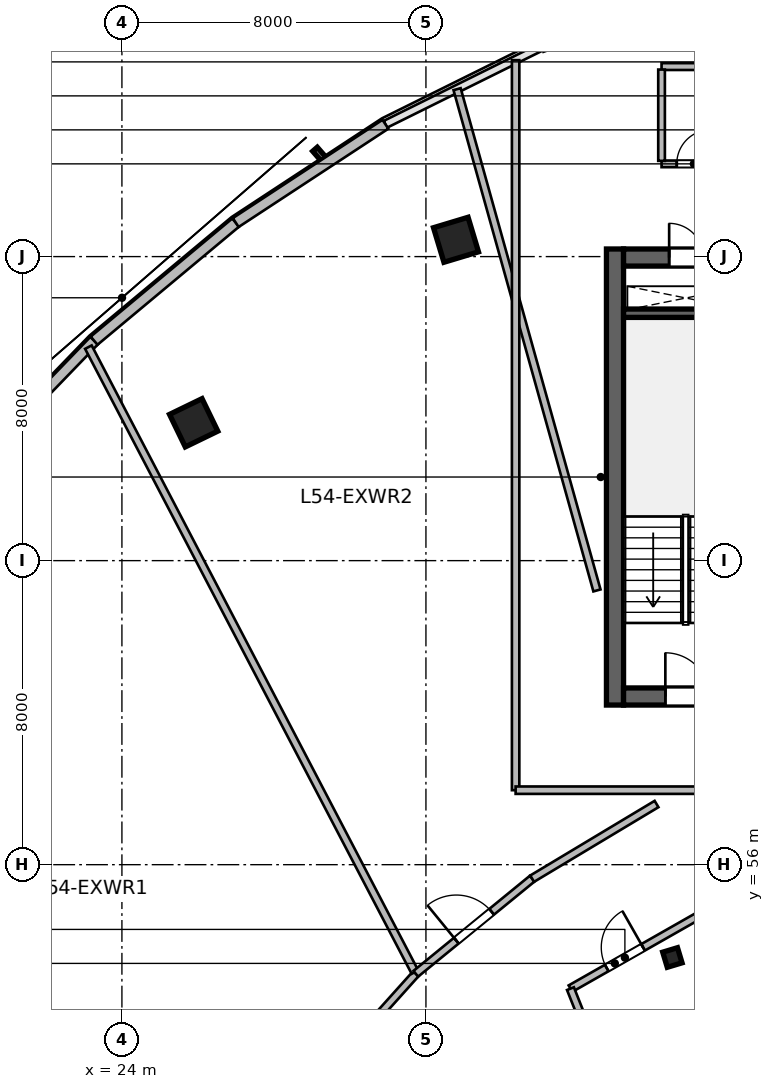
"""IFC4 building model, lengths in metres.
Left out: names, types, materials, properties, quantities, classifications, styles, units other than length and angle.
Written with IfcOpenShell. Run it as: python <this file> out.ifc"""

import sys

from ifc_helpers import new_model, si_unit, direction, frame, frame_2d, origin, origin_2d, place, context, subcontext, project, spatial, rectangle, i_section, extrude, source, transform, mapped, element, fill, save


model = new_model("IFC4")
c1 = context("Model", 3, precision=1e-05, world=origin(), true_north=direction((0.0, 1.0)))
c2 = subcontext(c1, "Body", "Model", "MODEL_VIEW")
j1 = project(units=[si_unit("LENGTHUNIT", "METRE"), si_unit("PLANEANGLEUNIT", "RADIAN")], contexts=[c1])
p1 = place(None, origin())
s1 = spatial("IfcSite", under=j1, at=p1, CompositionType="ELEMENT")
p2 = place(p1, origin())
s2 = spatial("IfcBuilding", under=s1, at=p2, CompositionType="ELEMENT")
p3 = place(p2, frame((0.0, 0.0, 223.5)))
s3 = spatial("IfcBuildingStorey", under=s2, at=p3, CompositionType="ELEMENT", Elevation=223.5)
m1 = source(origin(), c2, "Body", "SweptSolid", [
    extrude(rectangle(XDim=12.0, YDim=0.45, at=frame_2d((6.0, 0.0))), origin(), (0.0, 0.0, 1.0), 3.9),
])
p4 = place(p3, frame((36.975, 60.2, 0.0), z_axis=(0.0, 0.0, 1.0), x_axis=(0.0, 1.0, 0.0)))
e1 = element("IfcWall", 1, at=p4, inside=s3, PredefinedType="SHEAR", context=c2, shape_type="MappedRepresentation", body=[
    mapped(m1, transform((0.0, 0.0, 0.0), scale=1.0)),
])
m2 = source(origin(), c2, "Body", "SweptSolid", [
    extrude(rectangle(XDim=21.6, YDim=0.45, at=frame_2d((10.8, 0.0))), origin(), (0.0, 0.0, 1.0), 3.9),
])
p5 = place(p3, frame((37.2, 60.425, 0.0), z_axis=(0.0, 0.0, 1.0), x_axis=(1.0, 0.0, 0.0)))
e2 = element("IfcWall", 2, at=p5, inside=s3, PredefinedType="SHEAR", context=c2, shape_type="MappedRepresentation", body=[
    mapped(m2, transform((0.0, 0.0, 0.0), scale=1.0)),
])
p6 = place(p5, frame((1.1, 0.0, 0.0)))
e3 = element("IfcOpeningElement", 3, at=p6, cuts=e2, PredefinedType="OPENING", context=c2, shape_type="SweptSolid", body=[
    extrude(rectangle(XDim=1.15, YDim=2.15, at=frame_2d((0.575, 1.075))), frame((0.0, 0.235, 0.0), z_axis=(0.0, -1.0, 0.0), x_axis=(1.0, 0.0, 0.0)), (0.0, 0.0, 1.0), 0.47),
])
p7 = place(p5, frame((19.5, 0.0, 0.0)))
e4 = element("IfcOpeningElement", 4, at=p7, cuts=e2, PredefinedType="OPENING", context=c2, shape_type="SweptSolid", body=[
    extrude(rectangle(XDim=0.9, YDim=2.1, at=frame_2d((0.45, 1.05))), frame((0.0, 0.235, 0.0), z_axis=(0.0, -1.0, 0.0), x_axis=(1.0, 0.0, 0.0)), (0.0, 0.0, 1.0), 0.47),
])
p8 = place(p5, frame((12.02, 0.0, 0.0)))
e5 = element("IfcOpeningElement", 5, at=p8, cuts=e2, PredefinedType="OPENING", context=c2, shape_type="SweptSolid", body=[
    extrude(rectangle(XDim=1.6, YDim=2.15, at=frame_2d((0.8, 1.075))), frame((0.0, 0.235, 0.0), z_axis=(0.0, -1.0, 0.0), x_axis=(1.0, 0.0, 0.0)), (0.0, 0.0, 1.0), 0.47),
])
p9 = place(p3, frame((37.2, 71.975, 0.0), z_axis=(0.0, 0.0, 1.0), x_axis=(1.0, 0.0, 0.0)))
e6 = element("IfcWall", 6, at=p9, inside=s3, PredefinedType="SHEAR", context=c2, shape_type="MappedRepresentation", body=[
    mapped(m2, transform((0.0, 0.0, 0.0), scale=1.0)),
])
p10 = place(p9, frame((1.2, 0.0, 0.0)))
e7 = element("IfcOpeningElement", 7, at=p10, cuts=e6, PredefinedType="OPENING", context=c2, shape_type="SweptSolid", body=[
    extrude(rectangle(XDim=0.9, YDim=2.1, at=frame_2d((0.45, 1.05))), frame((0.0, 0.235, 0.0), z_axis=(0.0, -1.0, 0.0), x_axis=(1.0, 0.0, 0.0)), (0.0, 0.0, 1.0), 0.47),
])
p11 = place(p9, frame((14.7, 0.0, 0.0)))
e8 = element("IfcOpeningElement", 8, at=p11, cuts=e6, PredefinedType="OPENING", context=c2, shape_type="SweptSolid", body=[
    extrude(rectangle(XDim=1.2, YDim=2.15, at=frame_2d((0.6, 1.075))), frame((0.0, 0.235, 0.0), z_axis=(0.0, -1.0, 0.0), x_axis=(1.0, 0.0, 0.0)), (0.0, 0.0, 1.0), 0.47),
])
p12 = place(p9, frame((4.15, 0.0, 0.0)))
e9 = element("IfcOpeningElement", 9, at=p12, cuts=e6, PredefinedType="OPENING", context=c2, shape_type="SweptSolid", body=[
    extrude(rectangle(XDim=1.3, YDim=2.15, at=frame_2d((0.65, 1.075))), frame((0.0, 0.235, 0.0), z_axis=(0.0, -1.0, 0.0), x_axis=(1.0, 0.0, 0.0)), (0.0, 0.0, 1.0), 0.47),
])
p13 = place(p9, frame((7.1, 0.0, 0.0)))
e10 = element("IfcOpeningElement", 10, at=p13, cuts=e6, PredefinedType="OPENING", context=c2, shape_type="SweptSolid", body=[
    extrude(rectangle(XDim=0.9, YDim=2.1, at=frame_2d((0.45, 1.05))), frame((0.0, 0.235, 0.0), z_axis=(0.0, -1.0, 0.0), x_axis=(1.0, 0.0, 0.0)), (0.0, 0.0, 1.0), 0.47),
])
m3 = source(origin(), c2, "Body", "SweptSolid", [
    extrude(rectangle(XDim=3.27, YDim=0.22, at=frame_2d((1.635, 0.0))), origin(), (0.0, 0.0, 1.0), 3.9),
])
p14 = place(p3, frame((37.2, 70.51, 0.0), z_axis=(0.0, 0.0, 1.0), x_axis=(1.0, 0.0, 0.0)))
e11 = element("IfcWall", 11, at=p14, inside=s3, PredefinedType="SHEAR", context=c2, shape_type="MappedRepresentation", body=[
    mapped(m3, transform((0.0, 0.0, 0.0), scale=1.0)),
])
m4 = source(origin(), c2, "Body", "SweptSolid", [
    extrude(rectangle(XDim=0.95, YDim=0.95, at=origin_2d()), origin(), (0.0, 0.0, 1.0), 3.9),
])
p15 = place(p3, frame((25.888, 67.627, 0.0), z_axis=(0.0, 0.0, 1.0), x_axis=(-0.436173672171, 0.899862504889, 0.0)))
e12 = element("IfcColumn", 12, at=p15, inside=s3, PredefinedType="COLUMN", context=c2, shape_type="MappedRepresentation", body=[
    mapped(m4, transform((0.0, 0.0, 0.0), scale=1.0)),
])
m5 = source(origin(), c2, "Body", "SweptSolid", [
    extrude(i_section(OverallWidth=0.406, OverallDepth=0.416, WebThickness=0.03, FlangeThickness=0.048, at=origin_2d()), origin(), (0.0, 0.0, 1.0), 3.9),
])
p16 = place(p3, frame((38.485, 53.558, 0.0), z_axis=(0.0, 0.0, 1.0), x_axis=(-0.288697611798, 0.957420330337, 0.0)))
e13 = element("IfcColumn", 13, at=p16, inside=s3, PredefinedType="COLUMN", context=c2, shape_type="MappedRepresentation", body=[
    mapped(m5, transform((0.0, 0.0, 0.0), scale=1.0)),
])
p17 = place(p3, frame((32.791, 72.442, 0.0), z_axis=(0.0, 0.0, 1.0), x_axis=(-0.288697611798, 0.957420330337, 0.0)))
e14 = element("IfcColumn", 14, at=p17, inside=s3, PredefinedType="COLUMN", context=c2, shape_type="MappedRepresentation", body=[
    mapped(m4, transform((0.0, 0.0, 0.0), scale=1.0)),
])
m6 = source(origin(), c2, "Body", "SweptSolid", [
    extrude(rectangle(XDim=5.001, YDim=0.28, at=frame_2d((2.5, 0.0))), origin(), (0.0, 0.0, 1.0), 3.64),
])
p18 = place(p3, frame((19.795, 66.19, 0.0), z_axis=(0.0, 0.0, 1.0), x_axis=(0.694572731818, 0.719422490762, 0.0)))
e15 = element("IfcWall", 15, at=p18, inside=s3, PredefinedType="SOLIDWALL", context=c2, shape_type="MappedRepresentation", body=[
    mapped(m6, transform((0.0, 0.0, 0.0), scale=1.0)),
])
m7 = source(origin(), c2, "Body", "SweptSolid", [
    extrude(rectangle(XDim=4.852, YDim=0.28, at=frame_2d((2.426, 0.0))), origin(), (0.0, 0.0, 1.0), 3.64),
])
p19 = place(p3, frame((23.268, 69.788, 0.0), z_axis=(0.0, 0.0, 1.0), x_axis=(0.767936605821, 0.640525853843, 0.0)))
e16 = element("IfcWall", 16, at=p19, inside=s3, PredefinedType="SOLIDWALL", context=c2, shape_type="MappedRepresentation", body=[
    mapped(m7, transform((0.0, 0.0, 0.0), scale=1.0)),
])
m8 = source(origin(), c2, "Body", "SweptSolid", [
    extrude(rectangle(XDim=4.713, YDim=0.28, at=frame_2d((2.356, 0.0))), origin(), (0.0, 0.0, 1.0), 3.64),
])
p20 = place(p3, frame((26.994, 72.896, 0.0), z_axis=(0.0, 0.0, 1.0), x_axis=(0.835974386457, 0.548768462275, 0.0)))
e17 = element("IfcWall", 17, at=p20, inside=s3, PredefinedType="SOLIDWALL", context=c2, shape_type="MappedRepresentation", body=[
    mapped(m8, transform((0.0, 0.0, 0.0), scale=1.0)),
])
m9 = source(origin(), c2, "Body", "SweptSolid", [
    extrude(rectangle(XDim=4.0, YDim=0.175, at=frame_2d((2.0, 0.0))), origin(), (0.0, 0.0, 1.0), 3.64),
])
p21 = place(p3, frame((38.2, 74.44, 0.0), z_axis=(0.0, 0.0, 1.0), x_axis=(1.0, 0.0, 0.0)))
e18 = element("IfcWall", 18, at=p21, inside=s3, PredefinedType="PARTITIONING", context=c2, shape_type="MappedRepresentation", body=[
    mapped(m9, transform((0.0, 0.0, 0.0), scale=1.0)),
])
p22 = place(p21, frame((0.4, 0.0, 0.0)))
e19 = element("IfcOpeningElement", 19, at=p22, cuts=e18, PredefinedType="OPENING", context=c2, shape_type="SweptSolid", body=[
    extrude(rectangle(XDim=0.9, YDim=2.08, at=frame_2d((0.45, 1.04))), frame((0.0, 0.098, 0.0), z_axis=(0.0, -1.0, 0.0), x_axis=(1.0, 0.0, 0.0)), (0.0, 0.0, 1.0), 0.195),
])
m10 = source(origin(), c2, "Body", "SweptSolid", [
    extrude(rectangle(XDim=4.0, YDim=0.18, at=frame_2d((2.0, 0.0))), origin(), (0.0, 0.0, 1.0), 3.64),
])
p23 = place(p3, frame((38.2, 77.0, 0.0), z_axis=(0.0, 0.0, 1.0), x_axis=(1.0, 0.0, 0.0)))
e20 = element("IfcWall", 20, at=p23, inside=s3, PredefinedType="PLUMBINGWALL", context=c2, shape_type="MappedRepresentation", body=[
    mapped(m10, transform((0.0, 0.0, 0.0), scale=1.0)),
])
m11 = source(origin(), c2, "Body", "SweptSolid", [
    extrude(rectangle(XDim=2.403, YDim=0.175, at=frame_2d((1.201, 0.0))), origin(), (0.0, 0.0, 1.0), 3.64),
])
p24 = place(p3, frame((38.2, 74.519, 0.0), z_axis=(0.0, 0.0, 1.0), x_axis=(0.0, 1.0, 0.0)))
e21 = element("IfcWall", 21, at=p24, inside=s3, PredefinedType="PARTITIONING", context=c2, shape_type="MappedRepresentation", body=[
    mapped(m11, transform((0.0, 0.0, 0.0), scale=1.0)),
])
m12 = source(origin(), c2, "Body", "SweptSolid", [
    extrude(rectangle(XDim=4.796, YDim=0.195, at=frame_2d((2.398, 0.0))), origin(), (0.0, 0.0, 1.0), 3.64),
])
p25 = place(p3, frame((35.803, 52.738, 0.0), z_axis=(0.0, 0.0, 1.0), x_axis=(0.869231352707, 0.494405557686, 0.0)))
e22 = element("IfcWall", 22, at=p25, inside=s3, PredefinedType="PARTITIONING", context=c2, shape_type="MappedRepresentation", body=[
    mapped(m12, transform((0.0, 0.0, 0.0), scale=1.0)),
])
p26 = place(p25, frame((1.098, 0.0, 0.0)))
e23 = element("IfcOpeningElement", 23, at=p26, cuts=e22, PredefinedType="OPENING", context=c2, shape_type="SweptSolid", body=[
    extrude(rectangle(XDim=1.1, YDim=2.15, at=frame_2d((0.55, 1.075))), frame((0.0, 0.107, 0.0), z_axis=(0.0, -1.0, 0.0), x_axis=(1.0, 0.0, 0.0)), (0.0, 0.0, 1.0), 0.215),
])
m13 = source(origin(), c2, "Body", "SweptSolid", [
    extrude(rectangle(XDim=4.32, YDim=0.195, at=frame_2d((2.16, 0.0))), origin(), (0.0, 0.0, 1.0), 3.64),
])
p27 = place(p3, frame((37.396, 48.723, 0.0), z_axis=(0.0, 0.0, 1.0), x_axis=(-0.368846295269, 0.929490403644, 0.0)))
e24 = element("IfcWall", 24, at=p27, inside=s3, PredefinedType="PARTITIONING", context=c2, shape_type="MappedRepresentation", body=[
    mapped(m13, transform((0.0, 0.0, 0.0), scale=1.0)),
])
m14 = source(origin(), c2, "Body", "SweptSolid", [
    extrude(rectangle(XDim=5.407, YDim=0.195, at=frame_2d((2.704, 0.0))), origin(), (0.0, 0.0, 1.0), 3.64),
])
p28 = place(p3, frame((28.122, 49.105, 0.0), z_axis=(0.0, 0.0, 1.0), x_axis=(0.667851383423, 0.744294652447, 0.0)))
e25 = element("IfcWall", 25, at=p28, inside=s3, PredefinedType="PARTITIONING", context=c2, shape_type="MappedRepresentation", body=[
    mapped(m14, transform((0.0, 0.0, 0.0), scale=1.0)),
])
m15 = source(origin(), c2, "Body", "SweptSolid", [
    extrude(rectangle(XDim=16.854, YDim=0.195, at=frame_2d((8.427, 0.0))), origin(), (0.0, 0.0, 1.0), 3.64),
])
p29 = place(p3, frame((25.024, 44.369, 0.0), z_axis=(0.0, 0.0, 1.0), x_axis=(-0.716517105841, 0.697569521294, 0.0)))
e26 = element("IfcWall", 26, at=p29, inside=s3, PredefinedType="PARTITIONING", context=c2, shape_type="MappedRepresentation", body=[
    mapped(m15, transform((0.0, 0.0, 0.0), scale=1.0)),
])
m16 = source(origin(), c2, "Body", "SweptSolid", [
    extrude(rectangle(XDim=18.554, YDim=0.195, at=frame_2d((9.277, 0.0))), origin(), (0.0, 0.0, 1.0), 3.64),
])
p30 = place(p3, frame((31.71, 53.174, 0.0), z_axis=(0.0, 0.0, 1.0), x_axis=(-0.463116799203, 0.886297258427, 0.0)))
e27 = element("IfcWall", 27, at=p30, inside=s3, PredefinedType="PARTITIONING", context=c2, shape_type="MappedRepresentation", body=[
    mapped(m16, transform((0.0, 0.0, 0.0), scale=1.0)),
])
m17 = source(origin(), c2, "Body", "SweptSolid", [
    extrude(rectangle(XDim=3.954, YDim=0.195, at=frame_2d((1.977, 0.0))), origin(), (0.0, 0.0, 1.0), 3.64),
])
p31 = place(p3, frame((31.733, 53.13, 0.0), z_axis=(0.0, 0.0, 1.0), x_axis=(0.774345047596, 0.632763579281, 0.0)))
e28 = element("IfcWall", 28, at=p31, inside=s3, PredefinedType="PARTITIONING", context=c2, shape_type="MappedRepresentation", body=[
    mapped(m17, transform((0.0, 0.0, 0.0), scale=1.0)),
])
p32 = place(p31, frame((1.377, 0.0, 0.0)))
e29 = element("IfcOpeningElement", 29, at=p32, cuts=e28, PredefinedType="OPENING", context=c2, shape_type="SweptSolid", body=[
    extrude(rectangle(XDim=1.2, YDim=2.15, at=frame_2d((0.6, 1.075))), frame((0.0, 0.107, 0.0), z_axis=(0.0, -1.0, 0.0), x_axis=(1.0, 0.0, 0.0)), (0.0, 0.0, 1.0), 0.215),
])
m18 = source(origin(), c2, "Body", "SweptSolid", [
    extrude(rectangle(XDim=3.817, YDim=0.195, at=frame_2d((1.909, 0.0))), origin(), (0.0, 0.0, 1.0), 3.64),
])
p33 = place(p3, frame((34.795, 55.632, 0.0), z_axis=(0.0, 0.0, 1.0), x_axis=(0.857453418218, 0.514561595522, 0.0)))
e30 = element("IfcWall", 30, at=p33, inside=s3, PredefinedType="PARTITIONING", context=c2, shape_type="MappedRepresentation", body=[
    mapped(m18, transform((0.0, 0.0, 0.0), scale=1.0)),
])
m19 = source(origin(), c2, "Body", "SweptSolid", [
    extrude(rectangle(XDim=13.694, YDim=0.195, at=frame_2d((6.847, 0.0))), origin(), (0.0, 0.0, 1.0), 3.64),
])
p34 = place(p3, frame((36.5, 63.216, 0.0), z_axis=(0.0, 0.0, 1.0), x_axis=(-0.268753576604, 0.963208967495, 0.0)))
e31 = element("IfcWall", 31, at=p34, inside=s3, PredefinedType="PARTITIONING", context=c2, shape_type="MappedRepresentation", body=[
    mapped(m19, transform((0.0, 0.0, 0.0), scale=1.0)),
])
m20 = source(origin(), c2, "Body", "SweptSolid", [
    extrude(rectangle(XDim=19.209, YDim=0.195, at=frame_2d((9.604, 0.0))), origin(), (0.0, 0.0, 1.0), 3.64),
])
p35 = place(p3, frame((34.36, 57.96, 0.0), z_axis=(0.0, 0.0, 1.0), x_axis=(0.0, 1.0, 0.0)))
e32 = element("IfcWall", 32, at=p35, inside=s3, PredefinedType="PARTITIONING", context=c2, shape_type="MappedRepresentation", body=[
    mapped(m20, transform((0.0, 0.0, 0.0), scale=1.0)),
])
m21 = source(origin(), c2, "Body", "SweptSolid", [
    extrude(rectangle(XDim=12.39, YDim=0.195, at=frame_2d((6.195, 0.0))), origin(), (0.0, 0.0, 1.0), 3.64),
])
p36 = place(p3, frame((34.36, 57.96, 0.0), z_axis=(0.0, 0.0, 1.0), x_axis=(1.0, 0.0, 0.0)))
e33 = element("IfcWall", 33, at=p36, inside=s3, PredefinedType="PARTITIONING", context=c2, shape_type="MappedRepresentation", body=[
    mapped(m21, transform((0.0, 0.0, 0.0), scale=1.0)),
])
m22 = source(origin(), c2, "Body", "SweptSolid", [
    extrude(rectangle(XDim=1.15, YDim=2.15, at=frame_2d((0.575, 1.075))), frame((0.0, 0.025, 0.0), z_axis=(0.0, -1.0, 0.0), x_axis=(1.0, 0.0, 0.0)), (0.0, 0.0, 1.0), 0.05),
])
p37 = place(p6, origin())
e34 = element("IfcDoor", 34, at=p37, inside=s3, OperationType="SINGLE_SWING_LEFT", PredefinedType="DOOR", context=c2, shape_type="MappedRepresentation", body=[
    mapped(m22, transform((0.0, 0.0, 0.0), scale=1.0)),
])
fill(e3, e34)
m23 = source(origin(), c2, "Body", "SweptSolid", [
    extrude(rectangle(XDim=0.9, YDim=2.1, at=frame_2d((0.45, 1.05))), frame((0.0, 0.025, 0.0), z_axis=(0.0, -1.0, 0.0), x_axis=(1.0, 0.0, 0.0)), (0.0, 0.0, 1.0), 0.05),
])
p38 = place(p10, origin())
e35 = element("IfcDoor", 35, at=p38, inside=s3, OperationType="SINGLE_SWING_LEFT", PredefinedType="DOOR", context=c2, shape_type="MappedRepresentation", body=[
    mapped(m23, transform((0.0, 0.0, 0.0), scale=1.0)),
])
fill(e7, e35)
m24 = source(origin(), c2, "Body", "SweptSolid", [
    extrude(rectangle(XDim=0.9, YDim=2.08, at=frame_2d((0.45, 1.04))), frame((0.0, 0.025, 0.0), z_axis=(0.0, -1.0, 0.0), x_axis=(1.0, 0.0, 0.0)), (0.0, 0.0, 1.0), 0.05),
])
p39 = place(p22, origin())
e36 = element("IfcDoor", 36, at=p39, inside=s3, OperationType="SINGLE_SWING_RIGHT", PredefinedType="DOOR", context=c2, shape_type="MappedRepresentation", body=[
    mapped(m24, transform((0.0, 0.0, 0.0), scale=1.0)),
])
fill(e19, e36)
m25 = source(origin(), c2, "Body", "SweptSolid", [
    extrude(rectangle(XDim=1.1, YDim=2.15, at=frame_2d((0.55, 1.075))), frame((0.0, 0.025, 0.0), z_axis=(0.0, -1.0, 0.0), x_axis=(1.0, 0.0, 0.0)), (0.0, 0.0, 1.0), 0.05),
])
p40 = place(p26, origin())
e37 = element("IfcDoor", 37, at=p40, inside=s3, OperationType="SINGLE_SWING_RIGHT", PredefinedType="DOOR", context=c2, shape_type="MappedRepresentation", body=[
    mapped(m25, transform((0.0, 0.0, 0.0), scale=1.0)),
])
fill(e23, e37)
m26 = source(origin(), c2, "Body", "SweptSolid", [
    extrude(rectangle(XDim=1.2, YDim=2.15, at=frame_2d((0.6, 1.075))), frame((0.0, 0.025, 0.0), z_axis=(0.0, -1.0, 0.0), x_axis=(1.0, 0.0, 0.0)), (0.0, 0.0, 1.0), 0.05),
])
p41 = place(p32, origin())
e38 = element("IfcDoor", 38, at=p41, inside=s3, OperationType="SINGLE_SWING_LEFT", PredefinedType="DOOR", context=c2, shape_type="MappedRepresentation", body=[
    mapped(m26, transform((0.0, 0.0, 0.0), scale=1.0)),
])
fill(e29, e38)
save(model, sys.argv[1])
